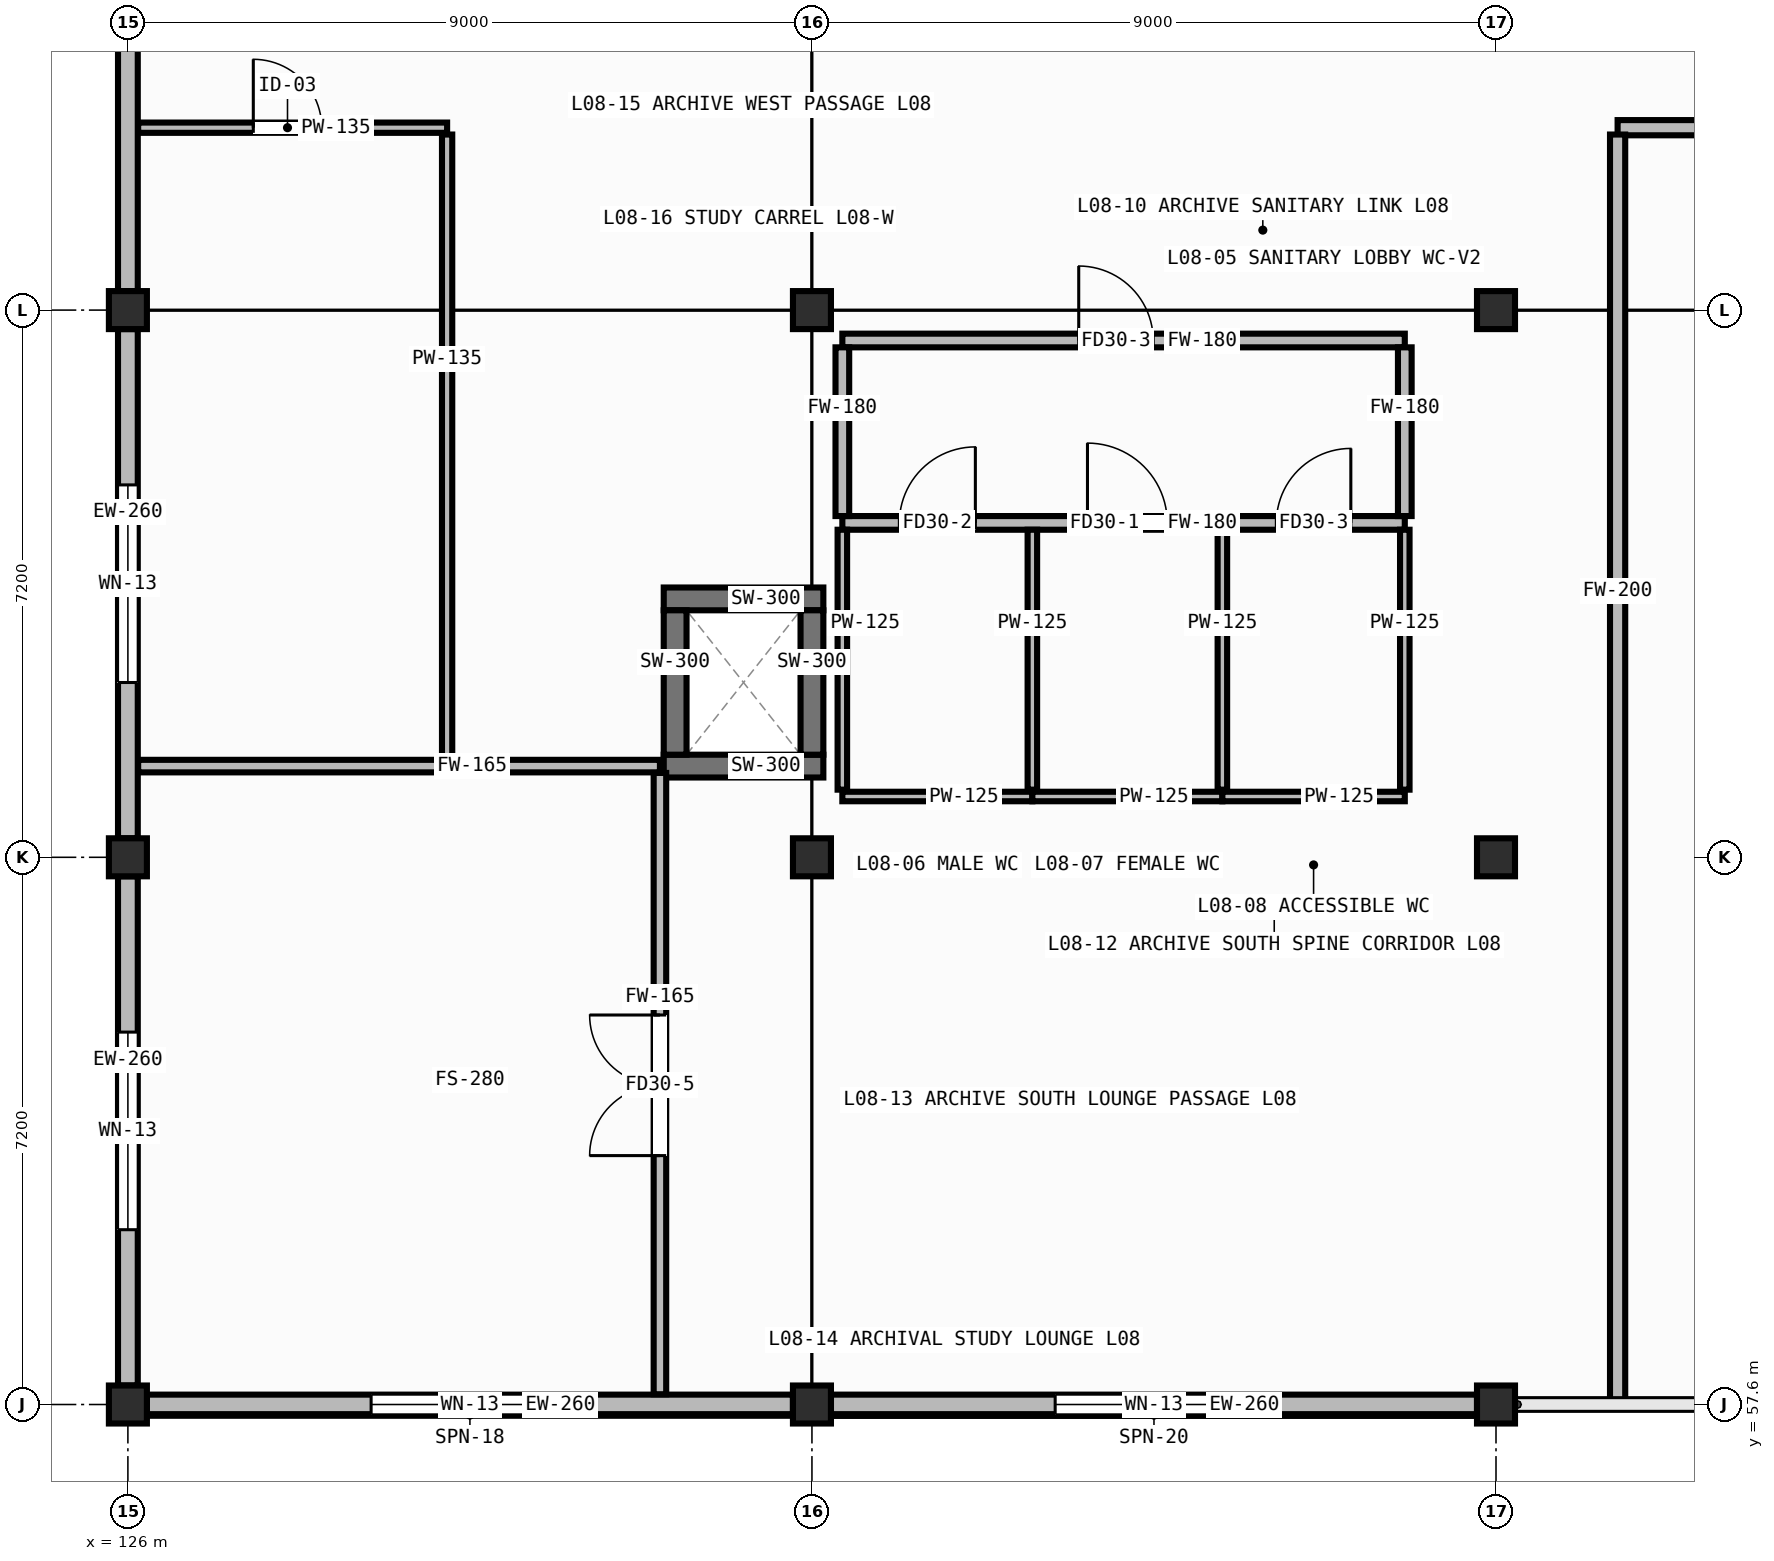
"""IFC4 building model, lengths in metres.
Left out: names, types, materials, properties, quantities, classifications, styles, units other than length and angle.
Written with IfcOpenShell. Run it as: python <this file> out.ifc"""

import sys

from ifc_helpers import new_model, si_unit, direction, frame, frame_2d, origin, origin_2d, place, context, subcontext, project, spatial, rectangle, hollow_rectangle, extrude, element, fill, save


model = new_model("IFC4")
c1 = context("Model", 3, precision=1e-05, world=origin(), true_north=direction((0.0, 1.0)))
c2 = subcontext(c1, "Body", "Model", "MODEL_VIEW")
j1 = project(units=[si_unit("LENGTHUNIT", "METRE"), si_unit("PLANEANGLEUNIT", "RADIAN")], contexts=[c1])
p1 = place(None, origin())
s1 = spatial("IfcSite", under=j1, at=p1, CompositionType="ELEMENT")
p2 = place(p1, origin())
s2 = spatial("IfcBuilding", under=s1, at=p2, CompositionType="ELEMENT")
p3 = place(p2, frame((0.0, 0.0, 27.8)))
s3 = spatial("IfcBuildingStorey", under=s2, at=p3, CompositionType="ELEMENT", Elevation=27.8)
for number, where, z_axis, x_axis in (
    (1, (126.0, 57.6, 0.0), (0.0, 0.0, 1.0), (1.0, 0.0, 0.0)),
    (2, (126.0, 64.8, 0.0), (0.0, 0.0, 1.0), (1.0, 0.0, 0.0)),
    (3, (126.0, 72.0, 0.0), (0.0, 0.0, 1.0), (1.0, 0.0, 0.0)),
    (4, (135.0, 57.6, 0.0), (0.0, 0.0, 1.0), (1.0, 0.0, 0.0)),
    (5, (135.0, 64.8, 0.0), (0.0, 0.0, 1.0), (1.0, 0.0, 0.0)),
    (6, (135.0, 72.0, 0.0), (0.0, 0.0, 1.0), (1.0, 0.0, 0.0)),
    (7, (144.0, 57.6, 0.0), (0.0, 0.0, 1.0), (1.0, 0.0, 0.0)),
    (8, (144.0, 64.8, 0.0), (0.0, 0.0, 1.0), (1.0, 0.0, 0.0)),
    (9, (144.0, 72.0, 0.0), (0.0, 0.0, 1.0), (1.0, 0.0, 0.0)),
):
    element("IfcColumn", number, at=place(p3, frame(where, z_axis=z_axis, x_axis=x_axis)), inside=s3, PredefinedType="COLUMN", context=c2, shape_type="SweptSolid", body=[
        extrude(hollow_rectangle(XDim=0.5, YDim=0.5, WallThickness=0.022, at=origin_2d()), origin(), (0.0, 0.0, 1.0), 3.6),
    ])
p4 = place(p3, frame((126.25, 57.6, 0.0), z_axis=(0.0, 0.0, 1.0), x_axis=(1.0, 0.0, 0.0)))
e10 = element("IfcWall", 10, at=p4, inside=s3, PredefinedType="STANDARD", context=c2, shape_type="SweptSolid", body=[
    extrude(rectangle(XDim=8.5, YDim=0.26, at=frame_2d((4.25, 0.0))), origin(), (0.0, 0.0, 1.0), 2.915),
])
p5 = place(p4, frame((2.95, 0.0, 0.85)))
e11 = element("IfcOpeningElement", 11, at=p5, cuts=e10, PredefinedType="OPENING", context=c2, shape_type="SweptSolid", body=[
    extrude(rectangle(XDim=2.6, YDim=1.6, at=frame_2d((1.3, 0.8))), frame((0.0, 0.142, 0.0), z_axis=(0.0, -1.0, 0.0), x_axis=(1.0, 0.0, 0.0)), (0.0, 0.0, 1.0), 0.284),
])
p6 = place(p3, frame((135.25, 57.6, 0.0), z_axis=(0.0, 0.0, 1.0), x_axis=(1.0, 0.0, 0.0)))
e12 = element("IfcWall", 12, at=p6, inside=s3, PredefinedType="STANDARD", context=c2, shape_type="SweptSolid", body=[
    extrude(rectangle(XDim=8.5, YDim=0.26, at=frame_2d((4.25, 0.0))), origin(), (0.0, 0.0, 1.0), 2.915),
])
p7 = place(p6, frame((2.95, 0.0, 0.85)))
e13 = element("IfcOpeningElement", 13, at=p7, cuts=e12, PredefinedType="OPENING", context=c2, shape_type="SweptSolid", body=[
    extrude(rectangle(XDim=2.6, YDim=1.6, at=frame_2d((1.3, 0.8))), frame((0.0, 0.142, 0.0), z_axis=(0.0, -1.0, 0.0), x_axis=(1.0, 0.0, 0.0)), (0.0, 0.0, 1.0), 0.284),
])
p8 = place(p3, frame((126.0, 57.85, 0.0), z_axis=(0.0, 0.0, 1.0), x_axis=(0.0, 1.0, 0.0)))
e14 = element("IfcWall", 14, at=p8, inside=s3, PredefinedType="STANDARD", context=c2, shape_type="SweptSolid", body=[
    extrude(rectangle(XDim=6.7, YDim=0.26, at=frame_2d((3.35, 0.0))), origin(), (0.0, 0.0, 1.0), 2.915),
])
p9 = place(p8, frame((2.05, 0.0, 0.85)))
e15 = element("IfcOpeningElement", 15, at=p9, cuts=e14, PredefinedType="OPENING", context=c2, shape_type="SweptSolid", body=[
    extrude(rectangle(XDim=2.6, YDim=1.6, at=frame_2d((1.3, 0.8))), frame((0.0, 0.142, 0.0), z_axis=(0.0, -1.0, 0.0), x_axis=(1.0, 0.0, 0.0)), (0.0, 0.0, 1.0), 0.284),
])
p10 = place(p3, frame((126.0, 65.05, 0.0), z_axis=(0.0, 0.0, 1.0), x_axis=(0.0, 1.0, 0.0)))
e16 = element("IfcWall", 16, at=p10, inside=s3, PredefinedType="STANDARD", context=c2, shape_type="SweptSolid", body=[
    extrude(rectangle(XDim=6.7, YDim=0.26, at=frame_2d((3.35, 0.0))), origin(), (0.0, 0.0, 1.0), 2.915),
])
p11 = place(p10, frame((2.05, 0.0, 0.85)))
e17 = element("IfcOpeningElement", 17, at=p11, cuts=e16, PredefinedType="OPENING", context=c2, shape_type="SweptSolid", body=[
    extrude(rectangle(XDim=2.6, YDim=1.6, at=frame_2d((1.3, 0.8))), frame((0.0, 0.142, 0.0), z_axis=(0.0, -1.0, 0.0), x_axis=(1.0, 0.0, 0.0)), (0.0, 0.0, 1.0), 0.284),
])
p12 = place(p3, frame((126.0, 72.25, 0.0), z_axis=(0.0, 0.0, 1.0), x_axis=(0.0, 1.0, 0.0)))
e18 = element("IfcWall", 18, at=p12, inside=s3, PredefinedType="STANDARD", context=c2, shape_type="SweptSolid", body=[
    extrude(rectangle(XDim=6.7, YDim=0.26, at=frame_2d((3.35, 0.0))), origin(), (0.0, 0.0, 1.0), 2.915),
])
for number, where, z_axis, x_axis in (
    (19, (133.05, 66.0, 0.0), (0.0, 0.0, 1.0), (1.0, 0.0, 0.0)),
    (20, (133.05, 68.2, 0.0), (0.0, 0.0, 1.0), (1.0, 0.0, 0.0)),
):
    element("IfcWall", number, at=place(p3, frame(where, z_axis=z_axis, x_axis=x_axis)), inside=s3, PredefinedType="SHEAR", context=c2, shape_type="SweptSolid", body=[
        extrude(rectangle(XDim=2.1, YDim=0.3, at=frame_2d((1.05, 0.0))), origin(), (0.0, 0.0, 1.0), 3.315),
    ])
for number, where, z_axis, x_axis in (
    (21, (133.2, 66.15, 0.0), (0.0, 0.0, 1.0), (0.0, 1.0, 0.0)),
    (22, (135.0, 66.15, 0.0), (0.0, 0.0, 1.0), (0.0, 1.0, 0.0)),
):
    element("IfcWall", number, at=place(p3, frame(where, z_axis=z_axis, x_axis=x_axis)), inside=s3, PredefinedType="SHEAR", context=c2, shape_type="SweptSolid", body=[
        extrude(rectangle(XDim=1.9, YDim=0.3, at=frame_2d((0.95, 0.0))), origin(), (0.0, 0.0, 1.0), 3.315),
    ])
p13 = place(p3, frame((135.4, 69.2, 0.0), z_axis=(0.0, 0.0, 1.0), x_axis=(1.0, 0.0, 0.0)))
e23 = element("IfcWall", 23, at=p13, inside=s3, PredefinedType="PARTITIONING", context=c2, shape_type="SweptSolid", body=[
    extrude(rectangle(XDim=7.4, YDim=0.18, at=frame_2d((3.7, 0.0))), origin(), (0.0, 0.0, 1.0), 3.315),
])
p14 = place(p13, frame((0.75, 0.0, 0.0)))
e24 = element("IfcOpeningElement", 24, at=p14, cuts=e23, PredefinedType="OPENING", context=c2, shape_type="SweptSolid", body=[
    extrude(rectangle(XDim=1.0, YDim=2.08, at=frame_2d((0.5, 1.04))), frame((0.0, 0.102, 0.0), z_axis=(0.0, -1.0, 0.0), x_axis=(1.0, 0.0, 0.0)), (0.0, 0.0, 1.0), 0.204),
])
p15 = place(p13, frame((3.225, 0.0, 0.0)))
e25 = element("IfcOpeningElement", 25, at=p15, cuts=e23, PredefinedType="OPENING", context=c2, shape_type="SweptSolid", body=[
    extrude(rectangle(XDim=1.05, YDim=2.1, at=frame_2d((0.525, 1.05))), frame((0.0, 0.102, 0.0), z_axis=(0.0, -1.0, 0.0), x_axis=(1.0, 0.0, 0.0)), (0.0, 0.0, 1.0), 0.204),
])
p16 = place(p13, frame((5.71, 0.0, 0.0)))
e26 = element("IfcOpeningElement", 26, at=p16, cuts=e23, PredefinedType="OPENING", context=c2, shape_type="SweptSolid", body=[
    extrude(rectangle(XDim=0.98, YDim=2.02, at=frame_2d((0.49, 1.01))), frame((0.0, 0.102, 0.0), z_axis=(0.0, -1.0, 0.0), x_axis=(1.0, 0.0, 0.0)), (0.0, 0.0, 1.0), 0.204),
])
p17 = place(p3, frame((135.4, 71.6, 0.0), z_axis=(0.0, 0.0, 1.0), x_axis=(1.0, 0.0, 0.0)))
e27 = element("IfcWall", 27, at=p17, inside=s3, PredefinedType="PARTITIONING", context=c2, shape_type="SweptSolid", body=[
    extrude(rectangle(XDim=7.4, YDim=0.18, at=frame_2d((3.7, 0.0))), origin(), (0.0, 0.0, 1.0), 3.315),
])
p18 = place(p17, frame((3.11, 0.0, 0.0)))
e28 = element("IfcOpeningElement", 28, at=p18, cuts=e27, PredefinedType="OPENING", context=c2, shape_type="SweptSolid", body=[
    extrude(rectangle(XDim=0.98, YDim=2.02, at=frame_2d((0.49, 1.01))), frame((0.0, 0.102, 0.0), z_axis=(0.0, -1.0, 0.0), x_axis=(1.0, 0.0, 0.0)), (0.0, 0.0, 1.0), 0.204),
])
for number, where, z_axis, x_axis in (
    (29, (135.4, 69.29, 0.0), (0.0, 0.0, 1.0), (0.0, 1.0, 0.0)),
    (30, (142.8, 69.29, 0.0), (0.0, 0.0, 1.0), (0.0, 1.0, 0.0)),
):
    element("IfcWall", number, at=place(p3, frame(where, z_axis=z_axis, x_axis=x_axis)), inside=s3, PredefinedType="PARTITIONING", context=c2, shape_type="SweptSolid", body=[
        extrude(rectangle(XDim=2.22, YDim=0.18, at=frame_2d((1.11, 0.0))), origin(), (0.0, 0.0, 1.0), 3.315),
    ])
p19 = place(p3, frame((135.4, 65.6, 0.0), z_axis=(0.0, 0.0, 1.0), x_axis=(1.0, 0.0, 0.0)))
e31 = element("IfcWall", 31, at=p19, inside=s3, PredefinedType="PARTITIONING", context=c2, shape_type="SweptSolid", body=[
    extrude(rectangle(XDim=2.5, YDim=0.125, at=frame_2d((1.25, 0.0))), origin(), (0.0, 0.0, 1.0), 3.315),
])
for number, where, z_axis, x_axis in (
    (32, (135.4, 65.69, 0.0), (0.0, 0.0, 1.0), (0.0, 1.0, 0.0)),
    (33, (137.9, 65.69, 0.0), (0.0, 0.0, 1.0), (0.0, 1.0, 0.0)),
):
    element("IfcWall", number, at=place(p3, frame(where, z_axis=z_axis, x_axis=x_axis)), inside=s3, PredefinedType="PARTITIONING", context=c2, shape_type="SweptSolid", body=[
        extrude(rectangle(XDim=3.42, YDim=0.125, at=frame_2d((1.71, 0.0))), origin(), (0.0, 0.0, 1.0), 3.315),
    ])
p20 = place(p3, frame((137.9, 65.6, 0.0), z_axis=(0.0, 0.0, 1.0), x_axis=(1.0, 0.0, 0.0)))
e34 = element("IfcWall", 34, at=p20, inside=s3, PredefinedType="PARTITIONING", context=c2, shape_type="SweptSolid", body=[
    extrude(rectangle(XDim=2.5, YDim=0.125, at=frame_2d((1.25, 0.0))), origin(), (0.0, 0.0, 1.0), 3.315),
])
p21 = place(p3, frame((140.4, 65.69, 0.0), z_axis=(0.0, 0.0, 1.0), x_axis=(0.0, 1.0, 0.0)))
e35 = element("IfcWall", 35, at=p21, inside=s3, PredefinedType="PARTITIONING", context=c2, shape_type="SweptSolid", body=[
    extrude(rectangle(XDim=3.42, YDim=0.125, at=frame_2d((1.71, 0.0))), origin(), (0.0, 0.0, 1.0), 3.315),
])
p22 = place(p3, frame((140.4, 65.6, 0.0), z_axis=(0.0, 0.0, 1.0), x_axis=(1.0, 0.0, 0.0)))
e36 = element("IfcWall", 36, at=p22, inside=s3, PredefinedType="PARTITIONING", context=c2, shape_type="SweptSolid", body=[
    extrude(rectangle(XDim=2.4, YDim=0.125, at=frame_2d((1.2, 0.0))), origin(), (0.0, 0.0, 1.0), 3.315),
])
p23 = place(p3, frame((142.8, 65.69, 0.0), z_axis=(0.0, 0.0, 1.0), x_axis=(0.0, 1.0, 0.0)))
e37 = element("IfcWall", 37, at=p23, inside=s3, PredefinedType="PARTITIONING", context=c2, shape_type="SweptSolid", body=[
    extrude(rectangle(XDim=3.42, YDim=0.125, at=frame_2d((1.71, 0.0))), origin(), (0.0, 0.0, 1.0), 3.315),
])
p24 = place(p3, frame((126.135, 66.0, 0.0), z_axis=(0.0, 0.0, 1.0), x_axis=(1.0, 0.0, 0.0)))
e38 = element("IfcWall", 38, at=p24, inside=s3, PredefinedType="PARTITIONING", context=c2, shape_type="SweptSolid", body=[
    extrude(rectangle(XDim=6.865, YDim=0.165, at=frame_2d((3.433, 0.0))), origin(), (0.0, 0.0, 1.0), 3.315),
])
p25 = place(p3, frame((133.0, 57.735, 0.0), z_axis=(0.0, 0.0, 1.0), x_axis=(0.0, 1.0, 0.0)))
e39 = element("IfcWall", 39, at=p25, inside=s3, PredefinedType="PARTITIONING", context=c2, shape_type="SweptSolid", body=[
    extrude(rectangle(XDim=8.175, YDim=0.165, at=frame_2d((4.087, 0.0))), origin(), (0.0, 0.0, 1.0), 3.315),
])
p26 = place(p25, frame((3.14, 0.0, 0.0)))
e40 = element("IfcOpeningElement", 40, at=p26, cuts=e39, PredefinedType="OPENING", context=c2, shape_type="SweptSolid", body=[
    extrude(rectangle(XDim=1.85, YDim=2.12, at=frame_2d((0.925, 1.06))), frame((0.0, 0.094, 0.0), z_axis=(0.0, -1.0, 0.0), x_axis=(1.0, 0.0, 0.0)), (0.0, 0.0, 1.0), 0.189),
])
p27 = place(p3, frame((126.135, 74.4, 0.0), z_axis=(0.0, 0.0, 1.0), x_axis=(1.0, 0.0, 0.0)))
e41 = element("IfcWall", 41, at=p27, inside=s3, PredefinedType="PARTITIONING", context=c2, shape_type="SweptSolid", body=[
    extrude(rectangle(XDim=4.065, YDim=0.135, at=frame_2d((2.032, 0.0))), origin(), (0.0, 0.0, 1.0), 3.315),
])
p28 = place(p27, frame((1.515, 0.0, 0.0)))
e42 = element("IfcOpeningElement", 42, at=p28, cuts=e41, PredefinedType="OPENING", context=c2, shape_type="SweptSolid", body=[
    extrude(rectangle(XDim=0.9, YDim=2.02, at=frame_2d((0.45, 1.01))), frame((0.0, 0.08, 0.0), z_axis=(0.0, -1.0, 0.0), x_axis=(1.0, 0.0, 0.0)), (0.0, 0.0, 1.0), 0.159),
])
p29 = place(p3, frame((130.2, 66.09, 0.0), z_axis=(0.0, 0.0, 1.0), x_axis=(0.0, 1.0, 0.0)))
e43 = element("IfcWall", 43, at=p29, inside=s3, PredefinedType="PARTITIONING", context=c2, shape_type="SweptSolid", body=[
    extrude(rectangle(XDim=8.22, YDim=0.135, at=frame_2d((4.11, 0.0))), origin(), (0.0, 0.0, 1.0), 3.315),
])
p30 = place(p3, frame((145.6, 74.4, 0.0), z_axis=(0.0, 0.0, 1.0), x_axis=(1.0, 0.0, 0.0)))
e44 = element("IfcWall", 44, at=p30, inside=s3, PredefinedType="PARTITIONING", context=c2, shape_type="SweptSolid", body=[
    extrude(rectangle(XDim=8.4, YDim=0.2, at=frame_2d((4.2, 0.0))), origin(), (0.0, 0.0, 1.0), 3.315),
])
p31 = place(p30, frame((3.6, 0.0, 0.0)))
e45 = element("IfcOpeningElement", 45, at=p31, cuts=e44, PredefinedType="OPENING", context=c2, shape_type="SweptSolid", body=[
    extrude(rectangle(XDim=1.2, YDim=2.1, at=frame_2d((0.6, 1.05))), frame((0.0, 0.112, 0.0), z_axis=(0.0, -1.0, 0.0), x_axis=(1.0, 0.0, 0.0)), (0.0, 0.0, 1.0), 0.224),
])
p32 = place(p3, frame((145.6, 57.635, 0.0), z_axis=(0.0, 0.0, 1.0), x_axis=(0.0, 1.0, 0.0)))
e46 = element("IfcWall", 46, at=p32, inside=s3, PredefinedType="PARTITIONING", context=c2, shape_type="SweptSolid", body=[
    extrude(rectangle(XDim=16.675, YDim=0.2, at=frame_2d((8.337, 0.0))), origin(), (0.0, 0.0, 1.0), 3.315),
])
p33 = place(p5, origin())
e47 = element("IfcWindow", 47, at=p33, inside=s3, PartitioningType="DOUBLE_PANEL_VERTICAL", PredefinedType="WINDOW", context=c2, shape_type="SweptSolid", body=[
    extrude(rectangle(XDim=2.6, YDim=1.6, at=frame_2d((1.3, 0.8))), frame((0.0, 0.03, 0.0), z_axis=(0.0, -1.0, 0.0), x_axis=(1.0, 0.0, 0.0)), (0.0, 0.0, 1.0), 0.06),
])
fill(e11, e47)
p34 = place(p7, origin())
e48 = element("IfcWindow", 48, at=p34, inside=s3, PartitioningType="DOUBLE_PANEL_VERTICAL", PredefinedType="WINDOW", context=c2, shape_type="SweptSolid", body=[
    extrude(rectangle(XDim=2.6, YDim=1.6, at=frame_2d((1.3, 0.8))), frame((0.0, 0.03, 0.0), z_axis=(0.0, -1.0, 0.0), x_axis=(1.0, 0.0, 0.0)), (0.0, 0.0, 1.0), 0.06),
])
fill(e13, e48)
p35 = place(p9, origin())
e49 = element("IfcWindow", 49, at=p35, inside=s3, PartitioningType="DOUBLE_PANEL_VERTICAL", PredefinedType="WINDOW", context=c2, shape_type="SweptSolid", body=[
    extrude(rectangle(XDim=2.6, YDim=1.6, at=frame_2d((1.3, 0.8))), frame((0.0, 0.03, 0.0), z_axis=(0.0, -1.0, 0.0), x_axis=(1.0, 0.0, 0.0)), (0.0, 0.0, 1.0), 0.06),
])
fill(e15, e49)
p36 = place(p11, origin())
e50 = element("IfcWindow", 50, at=p36, inside=s3, PartitioningType="DOUBLE_PANEL_VERTICAL", PredefinedType="WINDOW", context=c2, shape_type="SweptSolid", body=[
    extrude(rectangle(XDim=2.6, YDim=1.6, at=frame_2d((1.3, 0.8))), frame((0.0, 0.03, 0.0), z_axis=(0.0, -1.0, 0.0), x_axis=(1.0, 0.0, 0.0)), (0.0, 0.0, 1.0), 0.06),
])
fill(e17, e50)
p37 = place(p18, origin())
e51 = element("IfcDoor", 51, at=p37, inside=s3, OperationType="SINGLE_SWING_LEFT", PredefinedType="DOOR", context=c2, shape_type="SweptSolid", body=[
    extrude(rectangle(XDim=0.98, YDim=2.02, at=frame_2d((0.49, 1.01))), frame((0.0, 0.025, 0.0), z_axis=(0.0, -1.0, 0.0), x_axis=(1.0, 0.0, 0.0)), (0.0, 0.0, 1.0), 0.05),
])
fill(e28, e51)
p38 = place(p14, origin())
e52 = element("IfcDoor", 52, at=p38, inside=s3, OperationType="SINGLE_SWING_RIGHT", PredefinedType="DOOR", context=c2, shape_type="SweptSolid", body=[
    extrude(rectangle(XDim=1.0, YDim=2.08, at=frame_2d((0.5, 1.04))), frame((0.0, 0.025, 0.0), z_axis=(0.0, -1.0, 0.0), x_axis=(1.0, 0.0, 0.0)), (0.0, 0.0, 1.0), 0.05),
])
fill(e24, e52)
p39 = place(p15, origin())
e53 = element("IfcDoor", 53, at=p39, inside=s3, OperationType="SINGLE_SWING_LEFT", PredefinedType="DOOR", context=c2, shape_type="SweptSolid", body=[
    extrude(rectangle(XDim=1.05, YDim=2.1, at=frame_2d((0.525, 1.05))), frame((0.0, 0.025, 0.0), z_axis=(0.0, -1.0, 0.0), x_axis=(1.0, 0.0, 0.0)), (0.0, 0.0, 1.0), 0.05),
])
fill(e25, e53)
p40 = place(p16, origin())
e54 = element("IfcDoor", 54, at=p40, inside=s3, OperationType="SINGLE_SWING_RIGHT", PredefinedType="DOOR", context=c2, shape_type="SweptSolid", body=[
    extrude(rectangle(XDim=0.98, YDim=2.02, at=frame_2d((0.49, 1.01))), frame((0.0, 0.025, 0.0), z_axis=(0.0, -1.0, 0.0), x_axis=(1.0, 0.0, 0.0)), (0.0, 0.0, 1.0), 0.05),
])
fill(e26, e54)
p41 = place(p26, origin())
e55 = element("IfcDoor", 55, at=p41, inside=s3, OperationType="DOUBLE_DOOR_SINGLE_SWING", PredefinedType="DOOR", context=c2, shape_type="SweptSolid", body=[
    extrude(rectangle(XDim=1.85, YDim=2.12, at=frame_2d((0.925, 1.06))), frame((0.0, 0.025, 0.0), z_axis=(0.0, -1.0, 0.0), x_axis=(1.0, 0.0, 0.0)), (0.0, 0.0, 1.0), 0.05),
])
fill(e40, e55)
p42 = place(p28, origin())
e56 = element("IfcDoor", 56, at=p42, inside=s3, OperationType="SINGLE_SWING_LEFT", PredefinedType="DOOR", context=c2, shape_type="SweptSolid", body=[
    extrude(rectangle(XDim=0.9, YDim=2.02, at=frame_2d((0.45, 1.01))), frame((0.0, 0.025, 0.0), z_axis=(0.0, -1.0, 0.0), x_axis=(1.0, 0.0, 0.0)), (0.0, 0.0, 1.0), 0.05),
])
fill(e42, e56)
save(model, sys.argv[1])
